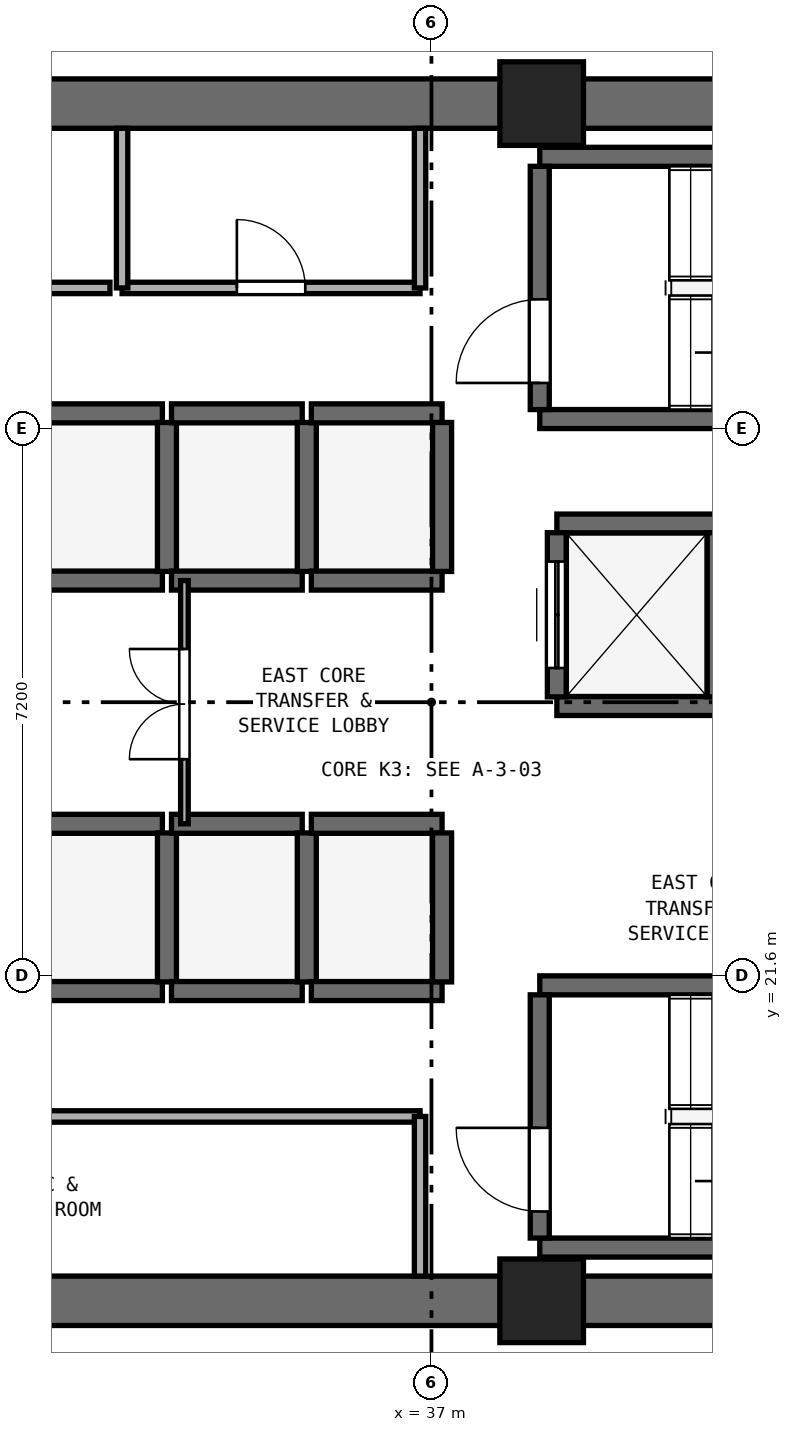
"""IFC4 building model, lengths in metres.
Left out: names, types, materials, properties, quantities, classifications, styles, units other than length and angle.
Written with IfcOpenShell. Run it as: python <this file> out.ifc"""

import sys

from ifc_helpers import new_model, si_unit, direction, frame, frame_2d, origin, origin_2d, place, context, subcontext, project, spatial, rectangle, extrude, element, fill, save


model = new_model("IFC4")
c1 = context("Model", 3, precision=1e-05, world=origin(), true_north=direction((0.0, 1.0)))
c2 = subcontext(c1, "Body", "Model", "MODEL_VIEW")
j1 = project(units=[si_unit("LENGTHUNIT", "METRE"), si_unit("PLANEANGLEUNIT", "RADIAN")], contexts=[c1])
p1 = place(None, origin())
s1 = spatial("IfcSite", under=j1, at=p1, CompositionType="ELEMENT")
p2 = place(p1, origin())
s2 = spatial("IfcBuilding", under=s1, at=p2, CompositionType="ELEMENT")
p3 = place(p2, frame((0.0, 0.0, 63.0)))
s3 = spatial("IfcBuildingStorey", under=s2, at=p3, CompositionType="ELEMENT", Elevation=63.0)
for number, where, z_axis, x_axis in (
    (1, (25.4, 17.325, 0.0), (0.0, 0.0, 1.0), (1.0, 0.0, 0.0)),
    (2, (25.4, 33.075, 0.0), (0.0, 0.0, 1.0), (1.0, 0.0, 0.0)),
):
    element("IfcWall", number, at=place(p3, frame(where, z_axis=z_axis, x_axis=x_axis)), inside=s3, PredefinedType="SHEAR", context=c2, shape_type="SweptSolid", body=[
        extrude(rectangle(XDim=23.2, YDim=0.65, at=frame_2d((11.6, 0.0))), origin(), (0.0, 0.0, 1.0), 3.525),
    ])
for number, where, z_axis, x_axis in (
    (3, (38.45, 17.325, 0.0), (0.0, 0.0, 1.0), (1.0, 0.0, 0.0)),
    (4, (38.45, 33.075, 0.0), (0.0, 0.0, 1.0), (1.0, 0.0, 0.0)),
):
    element("IfcColumn", number, at=place(p3, frame(where, z_axis=z_axis, x_axis=x_axis)), inside=s3, PredefinedType="PILASTER", context=c2, shape_type="SweptSolid", body=[
        extrude(rectangle(XDim=1.1, YDim=1.1, at=origin_2d()), origin(), (0.0, 0.0, 1.0), 3.8),
    ])
for number, where, z_axis, x_axis in (
    (5, (38.425, 28.925, 0.0), (0.0, 0.0, 1.0), (1.0, 0.0, 0.0)),
    (6, (38.425, 32.375, 0.0), (0.0, 0.0, 1.0), (1.0, 0.0, 0.0)),
):
    element("IfcWall", number, at=place(p3, frame(where, z_axis=z_axis, x_axis=x_axis)), inside=s3, PredefinedType="SHEAR", context=c2, shape_type="SweptSolid", body=[
        extrude(rectangle(XDim=7.3, YDim=0.25, at=frame_2d((3.65, 0.0))), origin(), (0.0, 0.0, 1.0), 3.525),
    ])
p4 = place(p3, frame((38.425, 29.05, 0.0), z_axis=(0.0, 0.0, 1.0), x_axis=(0.0, 1.0, 0.0)))
e7 = element("IfcWall", 7, at=p4, inside=s3, PredefinedType="SHEAR", context=c2, shape_type="SweptSolid", body=[
    extrude(rectangle(XDim=3.2, YDim=0.25, at=frame_2d((1.6, 0.0))), origin(), (0.0, 0.0, 1.0), 3.525),
])
p5 = place(p4, frame((0.35, 0.0, 0.0)))
e8 = element("IfcOpeningElement", 8, at=p5, cuts=e7, PredefinedType="OPENING", context=c2, shape_type="SweptSolid", body=[
    extrude(rectangle(XDim=1.1, YDim=2.15, at=frame_2d((0.55, 1.075))), frame((0.0, 0.135, 0.0), z_axis=(0.0, -1.0, 0.0), x_axis=(1.0, 0.0, 0.0)), (0.0, 0.0, 1.0), 0.27),
])
for number, where, z_axis, x_axis in (
    (9, (38.425, 18.025, 0.0), (0.0, 0.0, 1.0), (1.0, 0.0, 0.0)),
    (10, (38.425, 21.475, 0.0), (0.0, 0.0, 1.0), (1.0, 0.0, 0.0)),
):
    element("IfcWall", number, at=place(p3, frame(where, z_axis=z_axis, x_axis=x_axis)), inside=s3, PredefinedType="SHEAR", context=c2, shape_type="SweptSolid", body=[
        extrude(rectangle(XDim=7.3, YDim=0.25, at=frame_2d((3.65, 0.0))), origin(), (0.0, 0.0, 1.0), 3.525),
    ])
p6 = place(p3, frame((38.425, 18.15, 0.0), z_axis=(0.0, 0.0, 1.0), x_axis=(0.0, 1.0, 0.0)))
e11 = element("IfcWall", 11, at=p6, inside=s3, PredefinedType="SHEAR", context=c2, shape_type="SweptSolid", body=[
    extrude(rectangle(XDim=3.2, YDim=0.25, at=frame_2d((1.6, 0.0))), origin(), (0.0, 0.0, 1.0), 3.525),
])
p7 = place(p6, frame((0.35, 0.0, 0.0)))
e12 = element("IfcOpeningElement", 12, at=p7, cuts=e11, PredefinedType="OPENING", context=c2, shape_type="SweptSolid", body=[
    extrude(rectangle(XDim=1.1, YDim=2.15, at=frame_2d((0.55, 1.075))), frame((0.0, 0.135, 0.0), z_axis=(0.0, -1.0, 0.0), x_axis=(1.0, 0.0, 0.0)), (0.0, 0.0, 1.0), 0.27),
])
for number, where, z_axis, x_axis in (
    (13, (31.74, 21.4, 0.0), (0.0, 0.0, 1.0), (1.0, 0.0, 0.0)),
    (14, (31.74, 23.6, 0.0), (0.0, 0.0, 1.0), (1.0, 0.0, 0.0)),
):
    element("IfcWall", number, at=place(p3, frame(where, z_axis=z_axis, x_axis=x_axis)), inside=s3, PredefinedType="SHEAR", context=c2, shape_type="SweptSolid", body=[
        extrude(rectangle(XDim=1.72, YDim=0.25, at=frame_2d((0.86, 0.0))), origin(), (0.0, 0.0, 1.0), 3.525),
    ])
p8 = place(p3, frame((33.52, 21.52, 0.0), z_axis=(0.0, 0.0, 1.0), x_axis=(0.0, 1.0, 0.0)))
e15 = element("IfcWall", 15, at=p8, inside=s3, PredefinedType="SHEAR", context=c2, shape_type="SweptSolid", body=[
    extrude(rectangle(XDim=1.96, YDim=0.25, at=frame_2d((0.98, 0.0))), origin(), (0.0, 0.0, 1.0), 3.525),
])
for number, where, z_axis, x_axis in (
    (16, (33.58, 21.4, 0.0), (0.0, 0.0, 1.0), (1.0, 0.0, 0.0)),
    (17, (33.58, 23.6, 0.0), (0.0, 0.0, 1.0), (1.0, 0.0, 0.0)),
):
    element("IfcWall", number, at=place(p3, frame(where, z_axis=z_axis, x_axis=x_axis)), inside=s3, PredefinedType="SHEAR", context=c2, shape_type="SweptSolid", body=[
        extrude(rectangle(XDim=1.72, YDim=0.25, at=frame_2d((0.86, 0.0))), origin(), (0.0, 0.0, 1.0), 3.525),
    ])
p9 = place(p3, frame((35.36, 21.52, 0.0), z_axis=(0.0, 0.0, 1.0), x_axis=(0.0, 1.0, 0.0)))
e18 = element("IfcWall", 18, at=p9, inside=s3, PredefinedType="SHEAR", context=c2, shape_type="SweptSolid", body=[
    extrude(rectangle(XDim=1.96, YDim=0.25, at=frame_2d((0.98, 0.0))), origin(), (0.0, 0.0, 1.0), 3.525),
])
for number, where, z_axis, x_axis in (
    (19, (35.42, 21.4, 0.0), (0.0, 0.0, 1.0), (1.0, 0.0, 0.0)),
    (20, (35.42, 23.6, 0.0), (0.0, 0.0, 1.0), (1.0, 0.0, 0.0)),
):
    element("IfcWall", number, at=place(p3, frame(where, z_axis=z_axis, x_axis=x_axis)), inside=s3, PredefinedType="SHEAR", context=c2, shape_type="SweptSolid", body=[
        extrude(rectangle(XDim=1.72, YDim=0.25, at=frame_2d((0.86, 0.0))), origin(), (0.0, 0.0, 1.0), 3.525),
    ])
p10 = place(p3, frame((37.14, 21.52, 0.0), z_axis=(0.0, 0.0, 1.0), x_axis=(0.0, 1.0, 0.0)))
e21 = element("IfcWall", 21, at=p10, inside=s3, PredefinedType="SHEAR", context=c2, shape_type="SweptSolid", body=[
    extrude(rectangle(XDim=1.96, YDim=0.25, at=frame_2d((0.98, 0.0))), origin(), (0.0, 0.0, 1.0), 3.525),
])
for number, where, z_axis, x_axis in (
    (22, (31.74, 26.8, 0.0), (0.0, 0.0, 1.0), (1.0, 0.0, 0.0)),
    (23, (31.74, 29.0, 0.0), (0.0, 0.0, 1.0), (1.0, 0.0, 0.0)),
):
    element("IfcWall", number, at=place(p3, frame(where, z_axis=z_axis, x_axis=x_axis)), inside=s3, PredefinedType="SHEAR", context=c2, shape_type="SweptSolid", body=[
        extrude(rectangle(XDim=1.72, YDim=0.25, at=frame_2d((0.86, 0.0))), origin(), (0.0, 0.0, 1.0), 3.525),
    ])
p11 = place(p3, frame((33.52, 26.92, 0.0), z_axis=(0.0, 0.0, 1.0), x_axis=(0.0, 1.0, 0.0)))
e24 = element("IfcWall", 24, at=p11, inside=s3, PredefinedType="SHEAR", context=c2, shape_type="SweptSolid", body=[
    extrude(rectangle(XDim=1.96, YDim=0.25, at=frame_2d((0.98, 0.0))), origin(), (0.0, 0.0, 1.0), 3.525),
])
for number, where, z_axis, x_axis in (
    (25, (33.58, 26.8, 0.0), (0.0, 0.0, 1.0), (1.0, 0.0, 0.0)),
    (26, (33.58, 29.0, 0.0), (0.0, 0.0, 1.0), (1.0, 0.0, 0.0)),
):
    element("IfcWall", number, at=place(p3, frame(where, z_axis=z_axis, x_axis=x_axis)), inside=s3, PredefinedType="SHEAR", context=c2, shape_type="SweptSolid", body=[
        extrude(rectangle(XDim=1.72, YDim=0.25, at=frame_2d((0.86, 0.0))), origin(), (0.0, 0.0, 1.0), 3.525),
    ])
p12 = place(p3, frame((35.36, 26.92, 0.0), z_axis=(0.0, 0.0, 1.0), x_axis=(0.0, 1.0, 0.0)))
e27 = element("IfcWall", 27, at=p12, inside=s3, PredefinedType="SHEAR", context=c2, shape_type="SweptSolid", body=[
    extrude(rectangle(XDim=1.96, YDim=0.25, at=frame_2d((0.98, 0.0))), origin(), (0.0, 0.0, 1.0), 3.525),
])
for number, where, z_axis, x_axis in (
    (28, (35.42, 26.8, 0.0), (0.0, 0.0, 1.0), (1.0, 0.0, 0.0)),
    (29, (35.42, 29.0, 0.0), (0.0, 0.0, 1.0), (1.0, 0.0, 0.0)),
):
    element("IfcWall", number, at=place(p3, frame(where, z_axis=z_axis, x_axis=x_axis)), inside=s3, PredefinedType="SHEAR", context=c2, shape_type="SweptSolid", body=[
        extrude(rectangle(XDim=1.72, YDim=0.25, at=frame_2d((0.86, 0.0))), origin(), (0.0, 0.0, 1.0), 3.525),
    ])
p13 = place(p3, frame((37.14, 26.92, 0.0), z_axis=(0.0, 0.0, 1.0), x_axis=(0.0, 1.0, 0.0)))
e30 = element("IfcWall", 30, at=p13, inside=s3, PredefinedType="SHEAR", context=c2, shape_type="SweptSolid", body=[
    extrude(rectangle(XDim=1.96, YDim=0.25, at=frame_2d((0.98, 0.0))), origin(), (0.0, 0.0, 1.0), 3.525),
])
for number, where, z_axis, x_axis in (
    (31, (38.65, 25.15, 0.0), (0.0, 0.0, 1.0), (1.0, 0.0, 0.0)),
    (32, (38.65, 27.55, 0.0), (0.0, 0.0, 1.0), (1.0, 0.0, 0.0)),
):
    element("IfcWall", number, at=place(p3, frame(where, z_axis=z_axis, x_axis=x_axis)), inside=s3, PredefinedType="SHEAR", context=c2, shape_type="SweptSolid", body=[
        extrude(rectangle(XDim=2.1, YDim=0.25, at=frame_2d((1.05, 0.0))), origin(), (0.0, 0.0, 1.0), 3.525),
    ])
p14 = place(p3, frame((38.65, 25.27, 0.0), z_axis=(0.0, 0.0, 1.0), x_axis=(0.0, 1.0, 0.0)))
e33 = element("IfcWall", 33, at=p14, inside=s3, PredefinedType="SHEAR", context=c2, shape_type="SweptSolid", body=[
    extrude(rectangle(XDim=2.16, YDim=0.25, at=frame_2d((1.08, 0.0))), origin(), (0.0, 0.0, 1.0), 3.525),
])
p15 = place(p14, frame((0.38, 0.0, 0.0)))
e34 = element("IfcOpeningElement", 34, at=p15, cuts=e33, PredefinedType="OPENING", context=c2, shape_type="SweptSolid", body=[
    extrude(rectangle(XDim=1.4, YDim=2.2, at=frame_2d((0.7, 1.1))), frame((0.0, 0.135, 0.0), z_axis=(0.0, -1.0, 0.0), x_axis=(1.0, 0.0, 0.0)), (0.0, 0.0, 1.0), 0.27),
])
p16 = place(p3, frame((40.75, 25.27, 0.0), z_axis=(0.0, 0.0, 1.0), x_axis=(0.0, 1.0, 0.0)))
e35 = element("IfcWall", 35, at=p16, inside=s3, PredefinedType="SHEAR", context=c2, shape_type="SweptSolid", body=[
    extrude(rectangle(XDim=2.16, YDim=0.25, at=frame_2d((1.08, 0.0))), origin(), (0.0, 0.0, 1.0), 3.525),
])
p17 = place(p3, frame((29.53, 30.65, 0.0), z_axis=(0.0, 0.0, 1.0), x_axis=(1.0, 0.0, 0.0)))
e36 = element("IfcWall", 36, at=p17, inside=s3, PredefinedType="PARTITIONING", context=c2, shape_type="SweptSolid", body=[
    extrude(rectangle(XDim=3.24, YDim=0.15, at=frame_2d((1.62, 0.0))), origin(), (0.0, 0.0, 1.0), 3.525),
])
p18 = place(p17, frame((1.145, 0.0, 0.0)))
e37 = element("IfcOpeningElement", 37, at=p18, cuts=e36, PredefinedType="OPENING", context=c2, shape_type="SweptSolid", body=[
    extrude(rectangle(XDim=0.95, YDim=2.1, at=frame_2d((0.475, 1.05))), frame((0.0, 0.085, 0.0), z_axis=(0.0, -1.0, 0.0), x_axis=(1.0, 0.0, 0.0)), (0.0, 0.0, 1.0), 0.17),
])
p19 = place(p3, frame((32.93, 30.65, 0.0), z_axis=(0.0, 0.0, 1.0), x_axis=(1.0, 0.0, 0.0)))
e38 = element("IfcWall", 38, at=p19, inside=s3, PredefinedType="PARTITIONING", context=c2, shape_type="SweptSolid", body=[
    extrude(rectangle(XDim=3.92, YDim=0.15, at=frame_2d((1.96, 0.0))), origin(), (0.0, 0.0, 1.0), 3.525),
])
p20 = place(p19, frame((1.51, 0.0, 0.0)))
e39 = element("IfcOpeningElement", 39, at=p20, cuts=e38, PredefinedType="OPENING", context=c2, shape_type="SweptSolid", body=[
    extrude(rectangle(XDim=0.9, YDim=2.1, at=frame_2d((0.45, 1.05))), frame((0.0, 0.085, 0.0), z_axis=(0.0, -1.0, 0.0), x_axis=(1.0, 0.0, 0.0)), (0.0, 0.0, 1.0), 0.17),
])
for number, where, z_axis, x_axis in (
    (40, (32.93, 30.65, 0.0), (0.0, 0.0, 1.0), (0.0, 1.0, 0.0)),
    (41, (36.85, 30.65, 0.0), (0.0, 0.0, 1.0), (0.0, 1.0, 0.0)),
):
    element("IfcWall", number, at=place(p3, frame(where, z_axis=z_axis, x_axis=x_axis)), inside=s3, PredefinedType="PARTITIONING", context=c2, shape_type="SweptSolid", body=[
        extrude(rectangle(XDim=2.1, YDim=0.15, at=frame_2d((1.05, 0.0))), origin(), (0.0, 0.0, 1.0), 3.525),
    ])
p21 = place(p3, frame((26.17, 19.75, 0.0), z_axis=(0.0, 0.0, 1.0), x_axis=(1.0, 0.0, 0.0)))
e42 = element("IfcWall", 42, at=p21, inside=s3, PredefinedType="PARTITIONING", context=c2, shape_type="SweptSolid", body=[
    extrude(rectangle(XDim=10.68, YDim=0.15, at=frame_2d((5.34, 0.0))), origin(), (0.0, 0.0, 1.0), 3.525),
])
p22 = place(p21, frame((4.865, 0.0, 0.0)))
e43 = element("IfcOpeningElement", 43, at=p22, cuts=e42, PredefinedType="OPENING", context=c2, shape_type="SweptSolid", body=[
    extrude(rectangle(XDim=0.95, YDim=2.1, at=frame_2d((0.475, 1.05))), frame((0.0, 0.085, 0.0), z_axis=(0.0, -1.0, 0.0), x_axis=(1.0, 0.0, 0.0)), (0.0, 0.0, 1.0), 0.17),
])
p23 = place(p3, frame((36.85, 17.65, 0.0), z_axis=(0.0, 0.0, 1.0), x_axis=(0.0, 1.0, 0.0)))
e44 = element("IfcWall", 44, at=p23, inside=s3, PredefinedType="PARTITIONING", context=c2, shape_type="SweptSolid", body=[
    extrude(rectangle(XDim=2.1, YDim=0.15, at=frame_2d((1.05, 0.0))), origin(), (0.0, 0.0, 1.0), 3.525),
])
p24 = place(p3, frame((33.75, 23.6, 0.0), z_axis=(0.0, 0.0, 1.0), x_axis=(0.0, 1.0, 0.0)))
e45 = element("IfcWall", 45, at=p24, inside=s3, PredefinedType="PARTITIONING", context=c2, shape_type="SweptSolid", body=[
    extrude(rectangle(XDim=3.2, YDim=0.1, at=frame_2d((1.6, 0.0))), origin(), (0.0, 0.0, 1.0), 3.525),
])
p25 = place(p24, frame((0.85, 0.0, 0.0)))
e46 = element("IfcOpeningElement", 46, at=p25, cuts=e45, PredefinedType="OPENING", context=c2, shape_type="SweptSolid", body=[
    extrude(rectangle(XDim=1.45, YDim=2.12, at=frame_2d((0.725, 1.06))), frame((0.0, 0.06, 0.0), z_axis=(0.0, -1.0, 0.0), x_axis=(1.0, 0.0, 0.0)), (0.0, 0.0, 1.0), 0.12),
])
p26 = place(p5, origin())
e47 = element("IfcDoor", 47, at=p26, inside=s3, OperationType="SINGLE_SWING_LEFT", PredefinedType="DOOR", context=c2, shape_type="SweptSolid", body=[
    extrude(rectangle(XDim=1.1, YDim=2.15, at=frame_2d((0.55, 1.075))), frame((0.0, 0.025, 0.0), z_axis=(0.0, -1.0, 0.0), x_axis=(1.0, 0.0, 0.0)), (0.0, 0.0, 1.0), 0.05),
])
fill(e8, e47)
p27 = place(p7, origin())
e48 = element("IfcDoor", 48, at=p27, inside=s3, OperationType="SINGLE_SWING_RIGHT", PredefinedType="DOOR", context=c2, shape_type="SweptSolid", body=[
    extrude(rectangle(XDim=1.1, YDim=2.15, at=frame_2d((0.55, 1.075))), frame((0.0, 0.025, 0.0), z_axis=(0.0, -1.0, 0.0), x_axis=(1.0, 0.0, 0.0)), (0.0, 0.0, 1.0), 0.05),
])
fill(e12, e48)
p28 = place(p15, origin())
e49 = element("IfcDoor", 49, at=p28, inside=s3, OperationType="DOUBLE_DOOR_SLIDING", PredefinedType="DOOR", context=c2, shape_type="SweptSolid", body=[
    extrude(rectangle(XDim=1.4, YDim=2.2, at=frame_2d((0.7, 1.1))), frame((0.0, 0.025, 0.0), z_axis=(0.0, -1.0, 0.0), x_axis=(1.0, 0.0, 0.0)), (0.0, 0.0, 1.0), 0.05),
])
fill(e34, e49)
p29 = place(p20, origin())
e50 = element("IfcDoor", 50, at=p29, inside=s3, OperationType="SINGLE_SWING_LEFT", PredefinedType="DOOR", context=c2, shape_type="SweptSolid", body=[
    extrude(rectangle(XDim=0.9, YDim=2.1, at=frame_2d((0.45, 1.05))), frame((0.0, 0.025, 0.0), z_axis=(0.0, -1.0, 0.0), x_axis=(1.0, 0.0, 0.0)), (0.0, 0.0, 1.0), 0.05),
])
fill(e39, e50)
p30 = place(p25, origin())
e51 = element("IfcDoor", 51, at=p30, inside=s3, OperationType="DOUBLE_DOOR_SINGLE_SWING", PredefinedType="DOOR", context=c2, shape_type="SweptSolid", body=[
    extrude(rectangle(XDim=1.45, YDim=2.12, at=frame_2d((0.725, 1.06))), frame((0.0, 0.025, 0.0), z_axis=(0.0, -1.0, 0.0), x_axis=(1.0, 0.0, 0.0)), (0.0, 0.0, 1.0), 0.05),
])
fill(e46, e51)
save(model, sys.argv[1])
